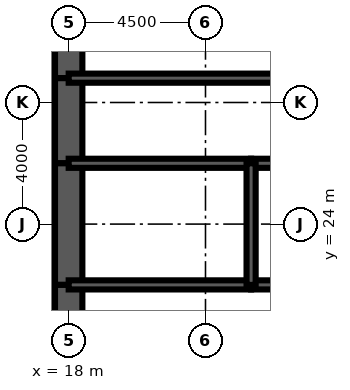
"""IFC4 building model, lengths in metres.
Left out: names, types, materials, properties, quantities, classifications, styles, units other than length and angle.
Written with IfcOpenShell. Run it as: python <this file> out.ifc"""

import sys

from ifc_helpers import new_model, si_unit, direction, frame, frame_2d, origin, place, context, subcontext, project, spatial, rectangle, extrude, element, fill, save


model = new_model("IFC4")
c1 = context("Model", 3, precision=1e-05, world=origin(), true_north=direction((0.0, 1.0)))
c2 = subcontext(c1, "Body", "Model", "MODEL_VIEW")
j1 = project(units=[si_unit("LENGTHUNIT", "METRE"), si_unit("PLANEANGLEUNIT", "RADIAN")], contexts=[c1])
p1 = place(None, origin())
s1 = spatial("IfcSite", under=j1, at=p1, CompositionType="ELEMENT")
p2 = place(p1, origin())
s2 = spatial("IfcBuilding", under=s1, at=p2, CompositionType="ELEMENT")
p3 = place(p2, frame((0.0, 0.0, 81.5)))
s3 = spatial("IfcBuildingStorey", under=s2, at=p3, CompositionType="ELEMENT", Elevation=81.5)
p4 = place(p3, frame((18.0, 32.0, 0.0), z_axis=(0.0, 0.0, 1.0), x_axis=(0.0, -1.0, 0.0)))
e1 = element("IfcWall", 1, at=p4, inside=s3, PredefinedType="SHEAR", context=c2, shape_type="SweptSolid", body=[
    extrude(rectangle(XDim=3.2, YDim=0.9, at=frame_2d((1.6, 0.0))), origin(), (0.0, 0.0, 1.0), 4.5),
])
p5 = place(p3, frame((18.0, 28.8, 0.0), z_axis=(0.0, 0.0, 1.0), x_axis=(0.0, -1.0, 0.0)))
e2 = element("IfcWall", 2, at=p5, inside=s3, PredefinedType="SHEAR", context=c2, shape_type="SweptSolid", body=[
    extrude(rectangle(XDim=2.8, YDim=0.9, at=frame_2d((1.4, 0.0))), origin(), (0.0, 0.0, 1.0), 4.5),
])
p6 = place(p5, frame((0.4, 0.0, 0.0)))
e3 = element("IfcOpeningElement", 3, at=p6, cuts=e2, PredefinedType="OPENING", context=c2, shape_type="SweptSolid", body=[
    extrude(rectangle(XDim=1.8, YDim=2.1, at=frame_2d((0.9, 1.05))), frame((0.0, 0.46, 0.0), z_axis=(0.0, -1.0, 0.0), x_axis=(1.0, 0.0, 0.0)), (0.0, 0.0, 1.0), 0.92),
])
p7 = place(p3, frame((18.0, 26.0, 0.0), z_axis=(0.0, 0.0, 1.0), x_axis=(0.0, -1.0, 0.0)))
e4 = element("IfcWall", 4, at=p7, inside=s3, PredefinedType="SHEAR", context=c2, shape_type="SweptSolid", body=[
    extrude(rectangle(XDim=4.0, YDim=0.9, at=frame_2d((2.0, 0.0))), origin(), (0.0, 0.0, 1.0), 4.5),
])
p8 = place(p3, frame((18.0, 22.0, 0.0), z_axis=(0.0, 0.0, 1.0), x_axis=(0.0, -1.0, 0.0)))
e5 = element("IfcWall", 5, at=p8, inside=s3, PredefinedType="SHEAR", context=c2, shape_type="SweptSolid", body=[
    extrude(rectangle(XDim=2.8, YDim=0.9, at=frame_2d((1.4, 0.0))), origin(), (0.0, 0.0, 1.0), 4.5),
])
p9 = place(p8, frame((0.6, 0.0, 0.0)))
e6 = element("IfcOpeningElement", 6, at=p9, cuts=e5, PredefinedType="OPENING", context=c2, shape_type="SweptSolid", body=[
    extrude(rectangle(XDim=1.8, YDim=2.1, at=frame_2d((0.9, 1.05))), frame((0.0, 0.46, 0.0), z_axis=(0.0, -1.0, 0.0), x_axis=(1.0, 0.0, 0.0)), (0.0, 0.0, 1.0), 0.92),
])
p10 = place(p3, frame((18.0, 28.8, 0.0), z_axis=(0.0, 0.0, 1.0), x_axis=(1.0, 0.0, 0.0)))
e7 = element("IfcWall", 7, at=p10, inside=s3, PredefinedType="SOLIDWALL", context=c2, shape_type="SweptSolid", body=[
    extrude(rectangle(XDim=9.0, YDim=0.3, at=frame_2d((4.5, 0.0))), origin(), (0.0, 0.0, 1.0), 4.5),
])
p11 = place(p10, frame((0.65, 0.0, 0.0)))
e8 = element("IfcOpeningElement", 8, at=p11, cuts=e7, PredefinedType="OPENING", context=c2, shape_type="SweptSolid", body=[
    extrude(rectangle(XDim=1.0, YDim=2.1, at=frame_2d((0.5, 1.05))), frame((0.0, 0.16, 0.0), z_axis=(0.0, -1.0, 0.0), x_axis=(1.0, 0.0, 0.0)), (0.0, 0.0, 1.0), 0.32),
])
p12 = place(p3, frame((18.0, 22.0, 0.0), z_axis=(0.0, 0.0, 1.0), x_axis=(1.0, 0.0, 0.0)))
e9 = element("IfcWall", 9, at=p12, inside=s3, PredefinedType="SOLIDWALL", context=c2, shape_type="SweptSolid", body=[
    extrude(rectangle(XDim=6.0, YDim=0.3, at=frame_2d((3.0, 0.0))), origin(), (0.0, 0.0, 1.0), 4.5),
])
p13 = place(p12, frame((4.4, 0.0, 0.0)))
e10 = element("IfcOpeningElement", 10, at=p13, cuts=e9, PredefinedType="OPENING", context=c2, shape_type="SweptSolid", body=[
    extrude(rectangle(XDim=1.0, YDim=2.1, at=frame_2d((0.5, 1.05))), frame((0.0, 0.16, 0.0), z_axis=(0.0, -1.0, 0.0), x_axis=(1.0, 0.0, 0.0)), (0.0, 0.0, 1.0), 0.32),
])
p14 = place(p12, frame((0.7, 0.0, 0.0)))
e11 = element("IfcOpeningElement", 11, at=p14, cuts=e9, PredefinedType="OPENING", context=c2, shape_type="SweptSolid", body=[
    extrude(rectangle(XDim=1.0, YDim=2.1, at=frame_2d((0.5, 1.05))), frame((0.0, 0.16, 0.0), z_axis=(0.0, -1.0, 0.0), x_axis=(1.0, 0.0, 0.0)), (0.0, 0.0, 1.0), 0.32),
])
p15 = place(p3, frame((24.0, 22.0, 0.0), z_axis=(0.0, 0.0, 1.0), x_axis=(1.0, 0.0, 0.0)))
e12 = element("IfcWall", 12, at=p15, inside=s3, PredefinedType="SOLIDWALL", context=c2, shape_type="SweptSolid", body=[
    extrude(rectangle(XDim=3.0, YDim=0.3, at=frame_2d((1.5, 0.0))), origin(), (0.0, 0.0, 1.0), 4.5),
])
p16 = place(p15, frame((1.0, 0.0, 0.0)))
e13 = element("IfcOpeningElement", 13, at=p16, cuts=e12, PredefinedType="OPENING", context=c2, shape_type="SweptSolid", body=[
    extrude(rectangle(XDim=1.0, YDim=2.1, at=frame_2d((0.5, 1.05))), frame((0.0, 0.16, 0.0), z_axis=(0.0, -1.0, 0.0), x_axis=(1.0, 0.0, 0.0)), (0.0, 0.0, 1.0), 0.32),
])
p17 = place(p3, frame((18.0, 26.0, 0.0), z_axis=(0.0, 0.0, 1.0), x_axis=(1.0, 0.0, 0.0)))
e14 = element("IfcWall", 14, at=p17, inside=s3, PredefinedType="SOLIDWALL", context=c2, shape_type="SweptSolid", body=[
    extrude(rectangle(XDim=6.0, YDim=0.3, at=frame_2d((3.0, 0.0))), origin(), (0.0, 0.0, 1.0), 4.5),
])
p18 = place(p3, frame((24.0, 26.0, 0.0), z_axis=(0.0, 0.0, 1.0), x_axis=(1.0, 0.0, 0.0)))
e15 = element("IfcWall", 15, at=p18, inside=s3, PredefinedType="SOLIDWALL", context=c2, shape_type="SweptSolid", body=[
    extrude(rectangle(XDim=3.0, YDim=0.3, at=frame_2d((1.5, 0.0))), origin(), (0.0, 0.0, 1.0), 4.5),
])
p19 = place(p3, frame((24.0, 22.0, 0.0), z_axis=(0.0, 0.0, 1.0), x_axis=(0.0, 1.0, 0.0)))
e16 = element("IfcWall", 16, at=p19, inside=s3, PredefinedType="SOLIDWALL", context=c2, shape_type="SweptSolid", body=[
    extrude(rectangle(XDim=4.0, YDim=0.3, at=frame_2d((2.0, 0.0))), origin(), (0.0, 0.0, 1.0), 4.5),
])
p20 = place(p3, frame((20.025, 22.15, 0.0), z_axis=(0.0, 0.0, 1.0), x_axis=(0.0, 1.0, 0.0)))
e17 = element("IfcWall", 17, at=p20, inside=s3, PredefinedType="PARTITIONING", context=c2, shape_type="SweptSolid", body=[
    extrude(rectangle(XDim=3.7, YDim=0.15, at=frame_2d((1.85, 0.0))), origin(), (0.0, 0.0, 1.0), 3.0),
])
p21 = place(p3, frame((23.7, 26.15, 0.0), z_axis=(0.0, 0.0, 1.0), x_axis=(0.0, 1.0, 0.0)))
e18 = element("IfcWall", 18, at=p21, inside=s3, PredefinedType="PARTITIONING", context=c2, shape_type="SweptSolid", body=[
    extrude(rectangle(XDim=2.5, YDim=0.15, at=frame_2d((1.25, 0.0))), origin(), (0.0, 0.0, 1.0), 3.0),
])
p22 = place(p21, frame((0.35, 0.0, 0.0)))
e19 = element("IfcOpeningElement", 19, at=p22, cuts=e18, PredefinedType="OPENING", context=c2, shape_type="SweptSolid", body=[
    extrude(rectangle(XDim=1.0, YDim=2.1, at=frame_2d((0.5, 1.05))), frame((0.0, 0.085, 0.0), z_axis=(0.0, -1.0, 0.0), x_axis=(1.0, 0.0, 0.0)), (0.0, 0.0, 1.0), 0.17),
])
p23 = place(p22, origin())
e20 = element("IfcDoor", 20, at=p23, inside=s3, OperationType="SINGLE_SWING_LEFT", PredefinedType="DOOR", context=c2, shape_type="SweptSolid", body=[
    extrude(rectangle(XDim=1.0, YDim=2.1, at=frame_2d((0.5, 1.05))), frame((0.0, 0.025, 0.0), z_axis=(0.0, -1.0, 0.0), x_axis=(1.0, 0.0, 0.0)), (0.0, 0.0, 1.0), 0.05),
])
fill(e19, e20)
p24 = place(p11, origin())
e21 = element("IfcDoor", 21, at=p24, inside=s3, OperationType="SINGLE_SWING_LEFT", PredefinedType="DOOR", context=c2, shape_type="SweptSolid", body=[
    extrude(rectangle(XDim=1.0, YDim=2.1, at=frame_2d((0.5, 1.05))), frame((0.0, 0.025, 0.0), z_axis=(0.0, -1.0, 0.0), x_axis=(1.0, 0.0, 0.0)), (0.0, 0.0, 1.0), 0.05),
])
fill(e8, e21)
p25 = place(p9, origin())
e22 = element("IfcDoor", 22, at=p25, inside=s3, OperationType="SINGLE_SWING_LEFT", PredefinedType="DOOR", context=c2, shape_type="SweptSolid", body=[
    extrude(rectangle(XDim=1.8, YDim=2.1, at=frame_2d((0.9, 1.05))), frame((0.0, 0.45, 0.0), z_axis=(0.0, -1.0, 0.0), x_axis=(1.0, 0.0, 0.0)), (0.0, 0.0, 1.0), 0.899),
])
fill(e6, e22)
p26 = place(p6, origin())
e23 = element("IfcDoor", 23, at=p26, inside=s3, OperationType="SINGLE_SWING_LEFT", PredefinedType="DOOR", context=c2, shape_type="SweptSolid", body=[
    extrude(rectangle(XDim=1.8, YDim=2.1, at=frame_2d((0.9, 1.05))), frame((0.0, 0.45, 0.0), z_axis=(0.0, -1.0, 0.0), x_axis=(1.0, 0.0, 0.0)), (0.0, 0.0, 1.0), 0.899),
])
fill(e3, e23)
p27 = place(p13, origin())
e24 = element("IfcDoor", 24, at=p27, inside=s3, OperationType="SINGLE_SWING_RIGHT", PredefinedType="DOOR", context=c2, shape_type="SweptSolid", body=[
    extrude(rectangle(XDim=1.0, YDim=2.1, at=frame_2d((0.5, 1.05))), frame((0.0, 0.025, 0.0), z_axis=(0.0, -1.0, 0.0), x_axis=(1.0, 0.0, 0.0)), (0.0, 0.0, 1.0), 0.05),
])
fill(e10, e24)
p28 = place(p14, origin())
e25 = element("IfcDoor", 25, at=p28, inside=s3, OperationType="SINGLE_SWING_LEFT", PredefinedType="DOOR", context=c2, shape_type="SweptSolid", body=[
    extrude(rectangle(XDim=1.0, YDim=2.1, at=frame_2d((0.5, 1.05))), frame((0.0, 0.025, 0.0), z_axis=(0.0, -1.0, 0.0), x_axis=(1.0, 0.0, 0.0)), (0.0, 0.0, 1.0), 0.05),
])
fill(e11, e25)
save(model, sys.argv[1])
